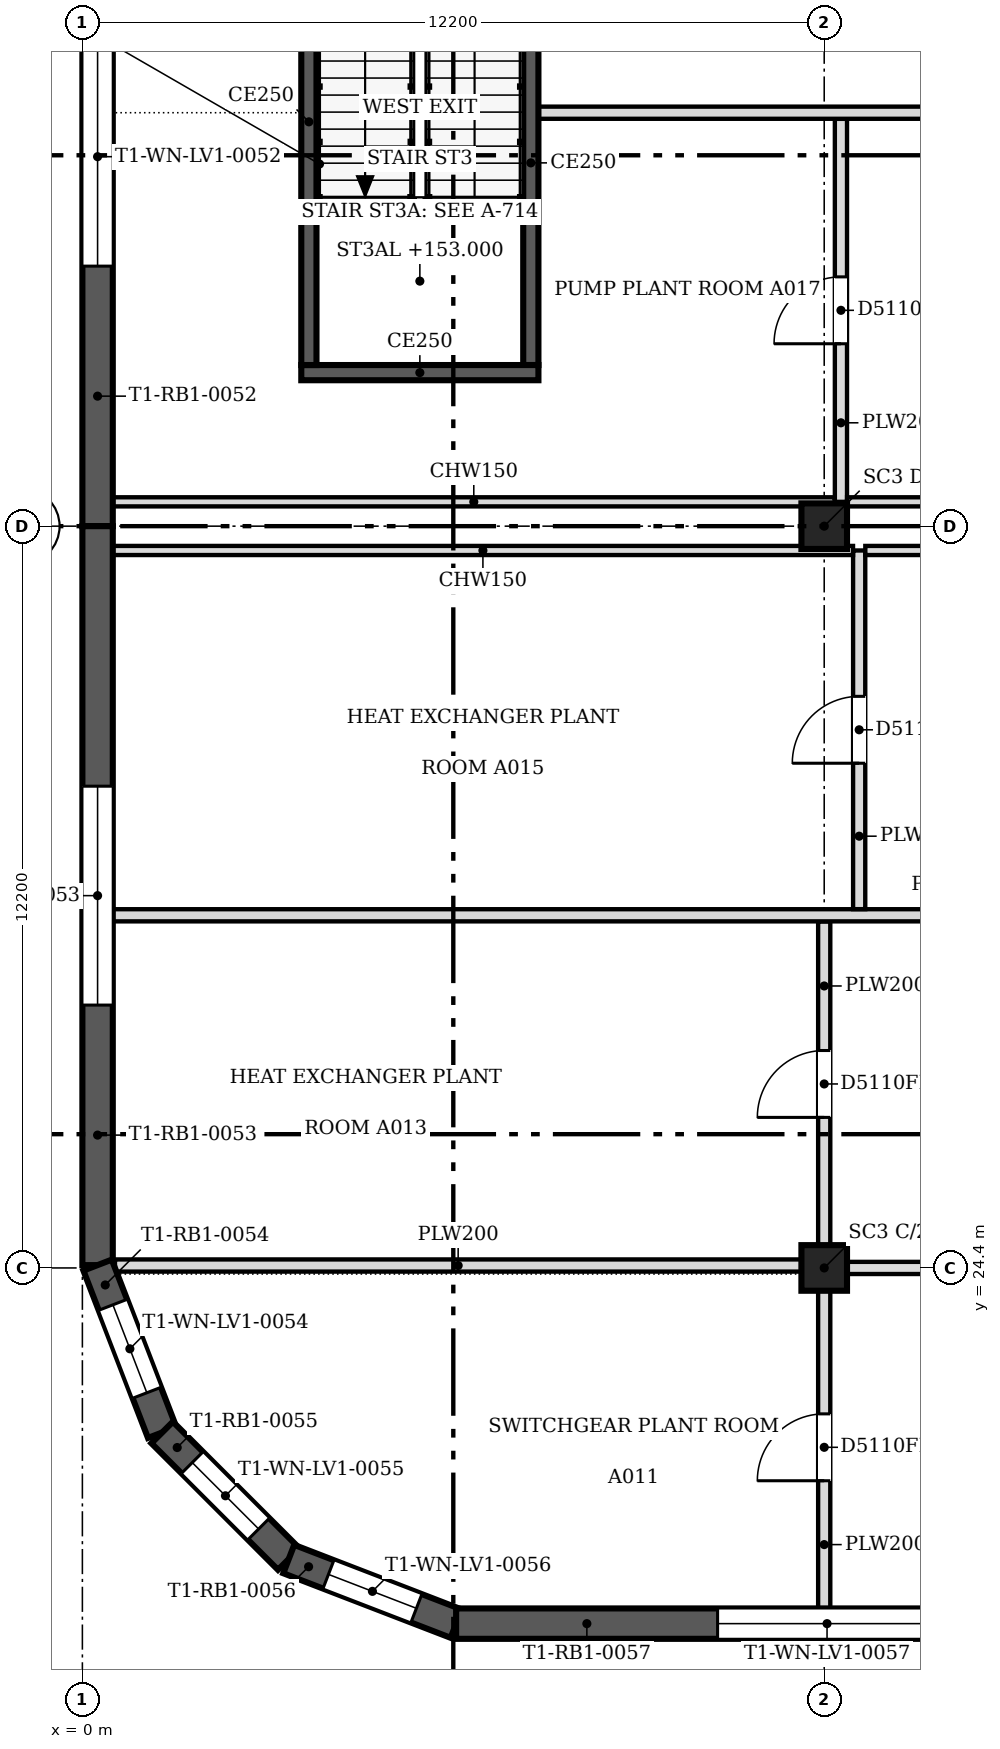
"""IFC4 building model, lengths in metres.
Left out: names, types, materials, properties, quantities, classifications, styles, units other than length and angle.
Written with IfcOpenShell. Run it as: python <this file> out.ifc"""

import sys

from ifc_helpers import new_model, si_unit, direction, frame, frame_2d, origin, origin_2d, place, context, subcontext, project, spatial, polyline, rectangle, outline, extrude, faceted_brep, source, transform, mapped, element, fill, save


model = new_model("IFC4")
c1 = context("Model", 3, precision=1e-05, world=origin(), true_north=direction((0.0, 1.0)))
c2 = subcontext(c1, "Body", "Model", "MODEL_VIEW")
j1 = project(units=[si_unit("LENGTHUNIT", "METRE"), si_unit("PLANEANGLEUNIT", "RADIAN")], contexts=[c1])
p1 = place(None, origin())
s1 = spatial("IfcSite", under=j1, at=p1, CompositionType="ELEMENT")
p2 = place(p1, origin())
s2 = spatial("IfcBuilding", under=s1, at=p2, CompositionType="ELEMENT")
p3 = place(p2, frame((0.0, 0.0, 150.6)))
s3 = spatial("IfcBuildingStorey", under=s2, at=p3, CompositionType="ELEMENT", Elevation=150.6)
for number, where, z_axis, x_axis in (
    (1, (12.2, 24.4, 0.0), (0.0, 0.0, 1.0), (1.0, 0.0, 0.0)),
    (2, (12.2, 36.6, 0.0), (0.0, 0.0, 1.0), (1.0, 0.0, 0.0)),
):
    element("IfcColumn", number, at=place(p3, frame(where, z_axis=z_axis, x_axis=x_axis)), inside=s3, PredefinedType="COLUMN", context=c2, shape_type="SweptSolid", body=[
        extrude(rectangle(XDim=0.75, YDim=0.75, at=origin_2d()), origin(), (0.0, 0.0, 1.0), 4.6),
    ])
m1 = source(origin(), c2, "Body", "Brep", [
    faceted_brep([(0.0, -0.25, 0.0), (12.154, -0.25, 0.0), (12.154, -0.25, 4.8), (0.0, -0.25, 4.8), (0.047, 0.25, 4.8), (12.154, 0.25, 4.8), (12.154, 0.25, 0.0), (0.047, 0.25, 0.0), (0.0, 0.0, 0.0), (0.0, 0.0, 4.8)], [[[0, 1, 2, 3]], [[4, 5, 6, 7]], [[7, 6, 1, 0, 8]], [[5, 4, 9, 3, 2]], [[8, 0, 3, 9]], [[7, 8, 9, 4]], [[1, 6, 5, 2]]]),
])
p4 = place(p3, frame((0.25, 48.753, 0.0), z_axis=(0.0, 0.0, 1.0), x_axis=(0.0, -1.0, 0.0)))
e3 = element("IfcWall", 3, at=p4, inside=s3, PredefinedType="SOLIDWALL", context=c2, shape_type="MappedRepresentation", body=[
    mapped(m1, transform((0.0, 0.0, 0.0), scale=1.0)),
])
m2 = source(origin(), c2, "Body", "SweptSolid", [
    extrude(outline(polyline([(4.277, 0.8), (7.877, 0.8), (7.877, 4.0), (4.277, 4.0), (4.277, 0.8)])), frame((0.0, 0.26, 0.0), z_axis=(0.0, -1.0, 0.0), x_axis=(1.0, 0.0, 0.0)), (0.0, 0.0, 1.0), 0.52),
])
p5 = place(p4, origin())
e4 = element("IfcOpeningElement", 4, at=p5, cuts=e3, PredefinedType="OPENING", context=c2, shape_type="MappedRepresentation", body=[
    mapped(m2, transform((0.0, 0.0, 0.0), scale=1.0)),
])
m3 = source(origin(), c2, "Body", "Brep", [
    faceted_brep([(0.0, -0.25, 0.0), (12.154, -0.25, 0.0), (12.154, -0.25, 4.8), (0.0, -0.25, 4.8), (0.0, 0.25, 4.8), (12.107, 0.25, 4.8), (12.107, 0.25, 0.0), (0.0, 0.25, 0.0), (12.154, -0.0, 0.0), (12.154, -0.0, 4.8)], [[[0, 1, 2, 3]], [[4, 5, 6, 7]], [[7, 6, 8, 1, 0]], [[9, 2, 1, 8]], [[5, 4, 3, 2, 9]], [[4, 7, 0, 3]], [[8, 6, 5, 9]]]),
])
p6 = place(p3, frame((0.25, 36.6, 0.0), z_axis=(0.0, 0.0, 1.0), x_axis=(0.0, -1.0, 0.0)))
e5 = element("IfcWall", 5, at=p6, inside=s3, PredefinedType="SOLIDWALL", context=c2, shape_type="MappedRepresentation", body=[
    mapped(m3, transform((0.0, 0.0, 0.0), scale=1.0)),
])
p7 = place(p6, origin())
e6 = element("IfcOpeningElement", 6, at=p7, cuts=e5, PredefinedType="OPENING", context=c2, shape_type="MappedRepresentation", body=[
    mapped(m2, transform((0.0, 0.0, 0.0), scale=1.0)),
])
m4 = source(origin(), c2, "Body", "Brep", [
    faceted_brep([(0.0, -0.25, 0.0), (2.95, -0.25, 0.0), (2.95, -0.25, 4.8), (0.0, -0.25, 4.8), (0.047, 0.25, 4.8), (2.898, 0.25, 4.8), (2.898, 0.25, 0.0), (0.047, 0.25, 0.0), (2.95, 0.0, 0.0), (0.0, 0.0, 0.0), (2.95, 0.0, 4.8), (0.0, 0.0, 4.8)], [[[0, 1, 2, 3]], [[4, 5, 6, 7]], [[7, 6, 8, 1, 0, 9]], [[10, 2, 1, 8]], [[5, 4, 11, 3, 2, 10]], [[9, 0, 3, 11]], [[7, 9, 11, 4]], [[8, 6, 5, 10]]]),
])
p8 = place(p3, frame((0.25, 24.447, 0.0), z_axis=(0.0, 0.0, 1.0), x_axis=(0.359877213415, -0.932999673775, 0.0)))
e7 = element("IfcWall", 7, at=p8, inside=s3, PredefinedType="SOLIDWALL", context=c2, shape_type="MappedRepresentation", body=[
    mapped(m4, transform((0.0, 0.0, 0.0), scale=1.0)),
])
m5 = source(origin(), c2, "Body", "SweptSolid", [
    extrude(outline(polyline([(0.7, 0.8), (2.25, 0.8), (2.25, 4.0), (0.7, 4.0), (0.7, 0.8)])), frame((0.0, 0.26, 0.0), z_axis=(0.0, -1.0, 0.0), x_axis=(1.0, 0.0, 0.0)), (0.0, 0.0, 1.0), 0.52),
])
p9 = place(p8, origin())
e8 = element("IfcOpeningElement", 8, at=p9, cuts=e7, PredefinedType="OPENING", context=c2, shape_type="MappedRepresentation", body=[
    mapped(m5, transform((0.0, 0.0, 0.0), scale=1.0)),
])
m6 = source(origin(), c2, "Body", "Brep", [
    faceted_brep([(0.0, -0.25, 0.0), (2.944, -0.25, 0.0), (2.944, -0.25, 4.8), (0.0, -0.25, 4.8), (0.053, 0.25, 4.8), (2.891, 0.25, 4.8), (2.891, 0.25, 0.0), (0.053, 0.25, 0.0), (2.944, 0.0, 0.0), (0.0, 0.0, 0.0), (2.944, 0.0, 4.8), (0.0, 0.0, 4.8)], [[[0, 1, 2, 3]], [[4, 5, 6, 7]], [[7, 6, 8, 1, 0, 9]], [[10, 2, 1, 8]], [[5, 4, 11, 3, 2, 10]], [[9, 0, 3, 11]], [[7, 9, 11, 4]], [[8, 6, 5, 10]]]),
])
p10 = place(p3, frame((1.312, 21.694, 0.0), z_axis=(0.0, 0.0, 1.0), x_axis=(0.707106781187, -0.707106781187, 0.0)))
e9 = element("IfcWall", 9, at=p10, inside=s3, PredefinedType="SOLIDWALL", context=c2, shape_type="MappedRepresentation", body=[
    mapped(m6, transform((0.0, 0.0, 0.0), scale=1.0)),
])
m7 = source(origin(), c2, "Body", "SweptSolid", [
    extrude(outline(polyline([(0.7, 0.8), (2.244, 0.8), (2.244, 4.0), (0.7, 4.0), (0.7, 0.8)])), frame((0.0, 0.26, 0.0), z_axis=(0.0, -1.0, 0.0), x_axis=(1.0, 0.0, 0.0)), (0.0, 0.0, 1.0), 0.52),
])
p11 = place(p10, origin())
e10 = element("IfcOpeningElement", 10, at=p11, cuts=e9, PredefinedType="OPENING", context=c2, shape_type="MappedRepresentation", body=[
    mapped(m7, transform((0.0, 0.0, 0.0), scale=1.0)),
])
m8 = source(origin(), c2, "Body", "Brep", [
    faceted_brep([(0.0, -0.25, 0.0), (2.95, -0.25, 0.0), (2.95, -0.25, 4.8), (0.0, -0.25, 4.8), (0.053, 0.25, 4.8), (2.904, 0.25, 4.8), (2.904, 0.25, 0.0), (0.053, 0.25, 0.0), (2.95, 0.0, 0.0), (0.0, 0.0, 0.0), (2.95, 0.0, 4.8), (0.0, 0.0, 4.8)], [[[0, 1, 2, 3]], [[4, 5, 6, 7]], [[7, 6, 8, 1, 0, 9]], [[10, 2, 1, 8]], [[5, 4, 11, 3, 2, 10]], [[9, 0, 3, 11]], [[7, 9, 11, 4]], [[8, 6, 5, 10]]]),
])
p12 = place(p3, frame((3.394, 19.612, 0.0), z_axis=(0.0, 0.0, 1.0), x_axis=(0.932999673775, -0.359877213415, 0.0)))
e11 = element("IfcWall", 11, at=p12, inside=s3, PredefinedType="SOLIDWALL", context=c2, shape_type="MappedRepresentation", body=[
    mapped(m8, transform((0.0, 0.0, 0.0), scale=1.0)),
])
p13 = place(p12, origin())
e12 = element("IfcOpeningElement", 12, at=p13, cuts=e11, PredefinedType="OPENING", context=c2, shape_type="MappedRepresentation", body=[
    mapped(m5, transform((0.0, 0.0, 0.0), scale=1.0)),
])
m9 = source(origin(), c2, "Body", "Brep", [
    faceted_brep([(0.0, -0.25, 0.0), (12.154, -0.25, 0.0), (12.154, -0.25, 4.8), (0.0, -0.25, 4.8), (0.047, 0.25, 4.8), (12.2, 0.25, 4.8), (12.2, 0.25, 0.0), (0.047, 0.25, 0.0), (12.2, -0.0, 0.0), (0.0, 0.0, 0.0), (12.2, -0.0, 4.8), (0.0, 0.0, 4.8)], [[[0, 1, 2, 3]], [[4, 5, 6, 7]], [[7, 6, 8, 1, 0, 9]], [[6, 5, 10, 8]], [[5, 4, 11, 3, 2, 10]], [[9, 0, 3, 11]], [[7, 9, 11, 4]], [[1, 8, 10, 2]]]),
])
p14 = place(p3, frame((6.146, 18.55, 0.0), z_axis=(0.0, 0.0, 1.0), x_axis=(1.0, 0.0, 0.0)))
e13 = element("IfcWall", 13, at=p14, inside=s3, PredefinedType="SOLIDWALL", context=c2, shape_type="MappedRepresentation", body=[
    mapped(m9, transform((0.0, 0.0, 0.0), scale=1.0)),
])
m10 = source(origin(), c2, "Body", "SweptSolid", [
    extrude(outline(polyline([(4.3, 0.8), (7.9, 0.8), (7.9, 4.0), (4.3, 4.0), (4.3, 0.8)])), frame((0.0, 0.26, 0.0), z_axis=(0.0, -1.0, 0.0), x_axis=(1.0, 0.0, 0.0)), (0.0, 0.0, 1.0), 0.52),
])
p15 = place(p14, origin())
e14 = element("IfcOpeningElement", 14, at=p15, cuts=e13, PredefinedType="OPENING", context=c2, shape_type="MappedRepresentation", body=[
    mapped(m10, transform((0.0, 0.0, 0.0), scale=1.0)),
])
p16 = place(p3, frame((7.5, 39.125, 0.0), z_axis=(0.0, 0.0, 1.0), x_axis=(-1.0, 0.0, 0.0)))
e15 = element("IfcWall", 15, at=p16, inside=s3, PredefinedType="SOLIDWALL", context=c2, shape_type="SweptSolid", body=[
    extrude(rectangle(XDim=3.9, YDim=0.25, at=frame_2d((1.95, 0.0))), origin(), (0.0, 0.0, 1.0), 4.8),
])
p17 = place(p3, frame((3.725, 39.25, 0.0), z_axis=(0.0, 0.0, 1.0), x_axis=(0.0, 1.0, 0.0)))
e16 = element("IfcWall", 16, at=p17, inside=s3, PredefinedType="SOLIDWALL", context=c2, shape_type="SweptSolid", body=[
    extrude(rectangle(XDim=8.0, YDim=0.25, at=frame_2d((4.0, 0.0))), origin(), (0.0, 0.0, 1.0), 4.8),
])
p18 = place(p3, frame((7.375, 47.25, 0.0), z_axis=(0.0, 0.0, 1.0), x_axis=(0.0, -1.0, 0.0)))
e17 = element("IfcWall", 17, at=p18, inside=s3, PredefinedType="SOLIDWALL", context=c2, shape_type="SweptSolid", body=[
    extrude(rectangle(XDim=8.0, YDim=0.25, at=frame_2d((4.0, 0.0))), origin(), (0.0, 0.0, 1.0), 4.8),
])
m11 = source(origin(), c2, "Body", "SweptSolid", [
    extrude(rectangle(XDim=1.2, YDim=2.1, at=frame_2d((0.6, 1.05))), frame((0.0, 0.135, 0.0), z_axis=(0.0, -1.0, 0.0), x_axis=(1.0, 0.0, 0.0)), (0.0, 0.0, 1.0), 0.27),
])
p19 = place(p18, frame((0.15, 0.0, 0.0)))
e18 = element("IfcOpeningElement", 18, at=p19, cuts=e17, PredefinedType="OPENING", context=c2, shape_type="MappedRepresentation", body=[
    mapped(m11, transform((0.0, 0.0, 0.0), scale=1.0)),
])
p20 = place(p3, frame((12.2, 18.8, 0.0), z_axis=(0.0, 0.0, 1.0), x_axis=(0.0, 1.0, 0.0)))
e19 = element("IfcWall", 19, at=p20, inside=s3, PredefinedType="PARTITIONING", context=c2, shape_type="SweptSolid", body=[
    extrude(rectangle(XDim=5.224, YDim=0.2, at=frame_2d((2.612, 0.0))), origin(), (0.0, 0.0, 1.0), 4.067),
])
m12 = source(origin(), c2, "Body", "SweptSolid", [
    extrude(rectangle(XDim=1.1, YDim=2.1, at=frame_2d((0.55, 1.05))), frame((0.0, 0.11, 0.0), z_axis=(0.0, -1.0, 0.0), x_axis=(1.0, 0.0, 0.0)), (0.0, 0.0, 1.0), 0.22),
])
p21 = place(p20, frame((2.1, 0.0, 0.0)))
e20 = element("IfcOpeningElement", 20, at=p21, cuts=e19, PredefinedType="OPENING", context=c2, shape_type="MappedRepresentation", body=[
    mapped(m12, transform((0.0, 0.0, 0.0), scale=1.0)),
])
p22 = place(p3, frame((0.536, 24.44, 0.0), z_axis=(0.0, 0.0, 1.0), x_axis=(1.0, 0.0, 0.0)))
e21 = element("IfcWall", 21, at=p22, inside=s3, PredefinedType="PARTITIONING", context=c2, shape_type="SweptSolid", body=[
    extrude(rectangle(XDim=11.288, YDim=0.2, at=frame_2d((5.644, 0.0))), origin(), (0.0, 0.0, 1.0), 4.067),
])
p23 = place(p3, frame((12.576, 24.4, 0.0), z_axis=(0.0, 0.0, 1.0), x_axis=(1.0, 0.0, 0.0)))
e22 = element("IfcWall", 22, at=p23, inside=s3, PredefinedType="PARTITIONING", context=c2, shape_type="SweptSolid", body=[
    extrude(rectangle(XDim=11.448, YDim=0.2, at=frame_2d((5.724, 0.0))), origin(), (0.0, 0.0, 1.0), 4.067),
])
p24 = place(p3, frame((12.2, 24.776, 0.0), z_axis=(0.0, 0.0, 1.0), x_axis=(0.0, 1.0, 0.0)))
e23 = element("IfcWall", 23, at=p24, inside=s3, PredefinedType="PARTITIONING", context=c2, shape_type="SweptSolid", body=[
    extrude(rectangle(XDim=5.323, YDim=0.2, at=frame_2d((2.662, 0.0))), origin(), (0.0, 0.0, 1.0), 4.067),
])
p25 = place(p24, frame((2.1, 0.0, 0.0)))
e24 = element("IfcOpeningElement", 24, at=p25, cuts=e23, PredefinedType="OPENING", context=c2, shape_type="MappedRepresentation", body=[
    mapped(m12, transform((0.0, 0.0, 0.0), scale=1.0)),
])
p26 = place(p3, frame((0.5, 30.2, 0.0), z_axis=(0.0, 0.0, 1.0), x_axis=(1.0, 0.0, 0.0)))
e25 = element("IfcWall", 25, at=p26, inside=s3, PredefinedType="PARTITIONING", context=c2, shape_type="SweptSolid", body=[
    extrude(rectangle(XDim=27.6, YDim=0.2, at=frame_2d((13.8, 0.0))), origin(), (0.0, 0.0, 1.0), 4.067),
])
p27 = place(p3, frame((12.775, 30.301, 0.0), z_axis=(0.0, 0.0, 1.0), x_axis=(0.0, 1.0, 0.0)))
e26 = element("IfcWall", 26, at=p27, inside=s3, PredefinedType="PARTITIONING", context=c2, shape_type="SweptSolid", body=[
    extrude(rectangle(XDim=5.899, YDim=0.2, at=frame_2d((2.949, 0.0))), origin(), (0.0, 0.0, 1.0), 4.067),
])
p28 = place(p27, frame((2.4, 0.0, 0.0)))
e27 = element("IfcOpeningElement", 27, at=p28, cuts=e26, PredefinedType="OPENING", context=c2, shape_type="MappedRepresentation", body=[
    mapped(m12, transform((0.0, 0.0, 0.0), scale=1.0)),
])
p29 = place(p3, frame((0.5, 36.2, 0.0), z_axis=(0.0, 0.0, 1.0), x_axis=(1.0, 0.0, 0.0)))
e28 = element("IfcWall", 28, at=p29, inside=s3, PredefinedType="PARTITIONING", context=c2, shape_type="SweptSolid", body=[
    extrude(rectangle(XDim=12.174, YDim=0.15, at=frame_2d((6.087, 0.0))), origin(), (0.0, 0.0, 1.0), 4.067),
])
p30 = place(p3, frame((12.876, 36.2, 0.0), z_axis=(0.0, 0.0, 1.0), x_axis=(1.0, 0.0, 0.0)))
e29 = element("IfcWall", 29, at=p30, inside=s3, PredefinedType="PARTITIONING", context=c2, shape_type="SweptSolid", body=[
    extrude(rectangle(XDim=15.123, YDim=0.15, at=frame_2d((7.562, 0.0))), origin(), (0.0, 0.0, 1.0), 4.067),
])
p31 = place(p3, frame((0.5, 37.0, 0.0), z_axis=(0.0, 0.0, 1.0), x_axis=(1.0, 0.0, 0.0)))
e30 = element("IfcWall", 30, at=p31, inside=s3, PredefinedType="PARTITIONING", context=c2, shape_type="SweptSolid", body=[
    extrude(rectangle(XDim=11.874, YDim=0.15, at=frame_2d((5.937, 0.0))), origin(), (0.0, 0.0, 1.0), 4.067),
])
p32 = place(p3, frame((12.475, 37.0, 0.0), z_axis=(0.0, 0.0, 1.0), x_axis=(0.0, 1.0, 0.0)))
e31 = element("IfcWall", 31, at=p32, inside=s3, PredefinedType="PARTITIONING", context=c2, shape_type="SweptSolid", body=[
    extrude(rectangle(XDim=6.299, YDim=0.2, at=frame_2d((3.149, 0.0))), origin(), (0.0, 0.0, 1.0), 4.067),
])
p33 = place(p32, frame((2.6, 0.0, 0.0)))
e32 = element("IfcOpeningElement", 32, at=p33, cuts=e31, PredefinedType="OPENING", context=c2, shape_type="MappedRepresentation", body=[
    mapped(m12, transform((0.0, 0.0, 0.0), scale=1.0)),
])
p34 = place(p3, frame((12.576, 37.0, 0.0), z_axis=(0.0, 0.0, 1.0), x_axis=(1.0, 0.0, 0.0)))
e33 = element("IfcWall", 33, at=p34, inside=s3, PredefinedType="PARTITIONING", context=c2, shape_type="SweptSolid", body=[
    extrude(rectangle(XDim=15.423, YDim=0.15, at=frame_2d((7.711, 0.0))), origin(), (0.0, 0.0, 1.0), 4.067),
])
p35 = place(p3, frame((7.5, 43.4, 0.0), z_axis=(0.0, 0.0, 1.0), x_axis=(1.0, 0.0, 0.0)))
e34 = element("IfcWall", 34, at=p35, inside=s3, PredefinedType="PARTITIONING", context=c2, shape_type="SweptSolid", body=[
    extrude(rectangle(XDim=20.6, YDim=0.2, at=frame_2d((10.3, 0.0))), origin(), (0.0, 0.0, 1.0), 4.067),
])
m13 = source(origin(), c2, "Body", "SweptSolid", [
    extrude(outline(polyline([(4.277, 0.8), (7.877, 0.8), (7.877, 4.0), (4.277, 4.0), (4.277, 0.8)])), frame((0.0, 0.03, 0.0), z_axis=(0.0, -1.0, 0.0), x_axis=(1.0, 0.0, 0.0)), (0.0, 0.0, 1.0), 0.06),
])
p36 = place(p5, origin())
e35 = element("IfcWindow", 35, at=p36, inside=s3, PartitioningType="USERDEFINED", PredefinedType="WINDOW", context=c2, shape_type="MappedRepresentation", body=[
    mapped(m13, transform((0.0, 0.0, 0.0), scale=1.0)),
])
fill(e4, e35)
p37 = place(p7, origin())
e36 = element("IfcWindow", 36, at=p37, inside=s3, PartitioningType="USERDEFINED", PredefinedType="WINDOW", context=c2, shape_type="MappedRepresentation", body=[
    mapped(m13, transform((0.0, 0.0, 0.0), scale=1.0)),
])
fill(e6, e36)
m14 = source(origin(), c2, "Body", "SweptSolid", [
    extrude(outline(polyline([(0.7, 0.8), (2.25, 0.8), (2.25, 4.0), (0.7, 4.0), (0.7, 0.8)])), frame((0.0, 0.03, 0.0), z_axis=(0.0, -1.0, 0.0), x_axis=(1.0, 0.0, 0.0)), (0.0, 0.0, 1.0), 0.06),
])
p38 = place(p9, origin())
e37 = element("IfcWindow", 37, at=p38, inside=s3, PartitioningType="USERDEFINED", PredefinedType="WINDOW", context=c2, shape_type="MappedRepresentation", body=[
    mapped(m14, transform((0.0, 0.0, 0.0), scale=1.0)),
])
fill(e8, e37)
m15 = source(origin(), c2, "Body", "SweptSolid", [
    extrude(outline(polyline([(0.7, 0.8), (2.244, 0.8), (2.244, 4.0), (0.7, 4.0), (0.7, 0.8)])), frame((0.0, 0.03, 0.0), z_axis=(0.0, -1.0, 0.0), x_axis=(1.0, 0.0, 0.0)), (0.0, 0.0, 1.0), 0.06),
])
p39 = place(p11, origin())
e38 = element("IfcWindow", 38, at=p39, inside=s3, PartitioningType="USERDEFINED", PredefinedType="WINDOW", context=c2, shape_type="MappedRepresentation", body=[
    mapped(m15, transform((0.0, 0.0, 0.0), scale=1.0)),
])
fill(e10, e38)
p40 = place(p13, origin())
e39 = element("IfcWindow", 39, at=p40, inside=s3, PartitioningType="USERDEFINED", PredefinedType="WINDOW", context=c2, shape_type="MappedRepresentation", body=[
    mapped(m14, transform((0.0, 0.0, 0.0), scale=1.0)),
])
fill(e12, e39)
m16 = source(origin(), c2, "Body", "SweptSolid", [
    extrude(outline(polyline([(4.3, 0.8), (7.9, 0.8), (7.9, 4.0), (4.3, 4.0), (4.3, 0.8)])), frame((0.0, 0.03, 0.0), z_axis=(0.0, -1.0, 0.0), x_axis=(1.0, 0.0, 0.0)), (0.0, 0.0, 1.0), 0.06),
])
p41 = place(p15, origin())
e40 = element("IfcWindow", 40, at=p41, inside=s3, PartitioningType="USERDEFINED", PredefinedType="WINDOW", context=c2, shape_type="MappedRepresentation", body=[
    mapped(m16, transform((0.0, 0.0, 0.0), scale=1.0)),
])
fill(e14, e40)
m17 = source(origin(), c2, "Body", "SweptSolid", [
    extrude(rectangle(XDim=1.1, YDim=2.1, at=frame_2d((0.55, 1.05))), frame((0.0, 0.025, 0.0), z_axis=(0.0, -1.0, 0.0), x_axis=(1.0, 0.0, 0.0)), (0.0, 0.0, 1.0), 0.05),
])
p42 = place(p21, origin())
e41 = element("IfcDoor", 41, at=p42, inside=s3, OperationType="SINGLE_SWING_LEFT", PredefinedType="DOOR", context=c2, shape_type="MappedRepresentation", body=[
    mapped(m17, transform((0.0, 0.0, 0.0), scale=1.0)),
])
fill(e20, e41)
p43 = place(p25, origin())
e42 = element("IfcDoor", 42, at=p43, inside=s3, OperationType="SINGLE_SWING_LEFT", PredefinedType="DOOR", context=c2, shape_type="MappedRepresentation", body=[
    mapped(m17, transform((0.0, 0.0, 0.0), scale=1.0)),
])
fill(e24, e42)
p44 = place(p28, origin())
e43 = element("IfcDoor", 43, at=p44, inside=s3, OperationType="SINGLE_SWING_LEFT", PredefinedType="DOOR", context=c2, shape_type="MappedRepresentation", body=[
    mapped(m17, transform((0.0, 0.0, 0.0), scale=1.0)),
])
fill(e27, e43)
p45 = place(p33, origin())
e44 = element("IfcDoor", 44, at=p45, inside=s3, OperationType="SINGLE_SWING_LEFT", PredefinedType="DOOR", context=c2, shape_type="MappedRepresentation", body=[
    mapped(m17, transform((0.0, 0.0, 0.0), scale=1.0)),
])
fill(e32, e44)
save(model, sys.argv[1])
